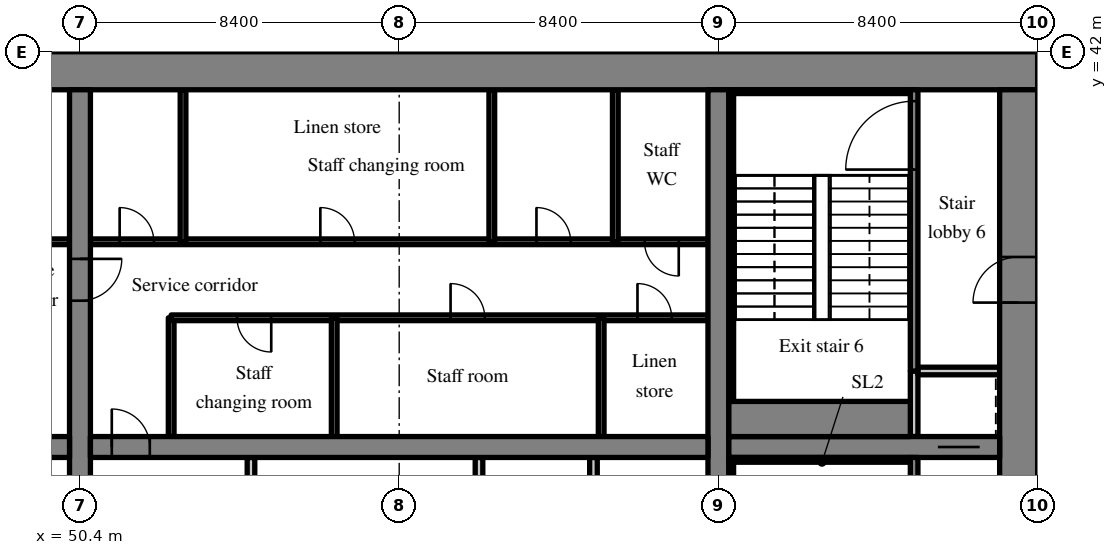
"""IFC4 building model, lengths in metres.
Left out: names, types, materials, properties, quantities, classifications, styles, units other than length and angle.
Written with IfcOpenShell. Run it as: python <this file> out.ifc"""

import sys

from ifc_helpers import new_model, si_unit, direction, frame, frame_2d, origin, place, context, subcontext, project, spatial, rectangle, extrude, source, transform, mapped, element, fill, save


model = new_model("IFC4")
c1 = context("Model", 3, precision=1e-05, world=origin(), true_north=direction((0.0, 1.0)))
c2 = subcontext(c1, "Body", "Model", "MODEL_VIEW")
j1 = project(units=[si_unit("LENGTHUNIT", "METRE"), si_unit("PLANEANGLEUNIT", "RADIAN")], contexts=[c1])
p1 = place(None, origin())
s1 = spatial("IfcSite", under=j1, at=p1, CompositionType="ELEMENT")
p2 = place(p1, origin())
s2 = spatial("IfcBuilding", under=s1, at=p2, CompositionType="ELEMENT")
p3 = place(p2, frame((0.0, 0.0, 62.0)))
s3 = spatial("IfcBuildingStorey", under=s2, at=p3, CompositionType="ELEMENT", Elevation=62.0)
m1 = source(origin(), c2, "Body", "SweptSolid", [
    extrude(rectangle(XDim=50.4, YDim=1.0, at=frame_2d((25.2, 0.0))), origin(), (0.0, 0.0, 1.0), 3.52),
])
p4 = place(p3, frame((25.2, 41.5, 0.0), z_axis=(0.0, 0.0, 1.0), x_axis=(1.0, 0.0, 0.0)))
e1 = element("IfcWall", 1, at=p4, inside=s3, PredefinedType="SHEAR", context=c2, shape_type="MappedRepresentation", body=[
    mapped(m1, transform((0.0, 0.0, 0.0), scale=1.0)),
])
m2 = source(origin(), c2, "Body", "SweptSolid", [
    extrude(rectangle(XDim=18.0, YDim=1.0, at=frame_2d((9.0, 0.0))), origin(), (0.0, 0.0, 1.0), 3.52),
])
p5 = place(p3, frame((75.1, 23.0, 0.0), z_axis=(0.0, 0.0, 1.0), x_axis=(0.0, 1.0, 0.0)))
e2 = element("IfcWall", 2, at=p5, inside=s3, PredefinedType="SHEAR", context=c2, shape_type="MappedRepresentation", body=[
    mapped(m2, transform((0.0, 0.0, 0.0), scale=1.0)),
])
m3 = source(origin(), c2, "Body", "SweptSolid", [
    extrude(rectangle(XDim=1.2, YDim=2.1, at=frame_2d((0.6, 1.05))), frame((0.0, 0.51, 0.0), z_axis=(0.0, -1.0, 0.0), x_axis=(1.0, 0.0, 0.0)), (0.0, 0.0, 1.0), 1.02),
])
p6 = place(p5, frame((12.4, 0.0, 0.0)))
e3 = element("IfcOpeningElement", 3, at=p6, cuts=e2, PredefinedType="OPENING", context=c2, shape_type="MappedRepresentation", body=[
    mapped(m3, transform((0.0, 0.0, 0.0), scale=1.0)),
])
m4 = source(origin(), c2, "Body", "SweptSolid", [
    extrude(rectangle(XDim=18.0, YDim=0.55, at=frame_2d((9.0, 0.0))), origin(), (0.0, 0.0, 1.0), 3.52),
])
p7 = place(p3, frame((50.4, 23.0, 0.0), z_axis=(0.0, 0.0, 1.0), x_axis=(0.0, 1.0, 0.0)))
e4 = element("IfcWall", 4, at=p7, inside=s3, PredefinedType="SHEAR", context=c2, shape_type="MappedRepresentation", body=[
    mapped(m4, transform((0.0, 0.0, 0.0), scale=1.0)),
])
m5 = source(origin(), c2, "Body", "SweptSolid", [
    extrude(rectangle(XDim=1.1, YDim=2.1, at=frame_2d((0.55, 1.05))), frame((0.0, 0.285, 0.0), z_axis=(0.0, -1.0, 0.0), x_axis=(1.0, 0.0, 0.0)), (0.0, 0.0, 1.0), 0.57),
])
p8 = place(p7, frame((12.45, 0.0, 0.0)))
e5 = element("IfcOpeningElement", 5, at=p8, cuts=e4, PredefinedType="OPENING", context=c2, shape_type="MappedRepresentation", body=[
    mapped(m5, transform((0.0, 0.0, 0.0), scale=1.0)),
])
p9 = place(p3, frame((67.2, 23.0, 0.0), z_axis=(0.0, 0.0, 1.0), x_axis=(0.0, 1.0, 0.0)))
e6 = element("IfcWall", 6, at=p9, inside=s3, PredefinedType="SHEAR", context=c2, shape_type="MappedRepresentation", body=[
    mapped(m4, transform((0.0, 0.0, 0.0), scale=1.0)),
])
m6 = source(origin(), c2, "Body", "SweptSolid", [
    extrude(rectangle(XDim=16.25, YDim=0.55, at=frame_2d((8.125, 0.0))), origin(), (0.0, 0.0, 1.0), 3.52),
])
p10 = place(p3, frame((33.875, 31.6, 0.0), z_axis=(0.0, 0.0, 1.0), x_axis=(1.0, 0.0, 0.0)))
e7 = element("IfcWall", 7, at=p10, inside=s3, PredefinedType="SHEAR", context=c2, shape_type="MappedRepresentation", body=[
    mapped(m6, transform((0.0, 0.0, 0.0), scale=1.0)),
])
m7 = source(origin(), c2, "Body", "SweptSolid", [
    extrude(rectangle(XDim=1.0, YDim=2.1, at=frame_2d((0.5, 1.05))), frame((0.0, 0.285, 0.0), z_axis=(0.0, -1.0, 0.0), x_axis=(1.0, 0.0, 0.0)), (0.0, 0.0, 1.0), 0.57),
])
p11 = place(p10, frame((14.687, 0.0, 0.0)))
e8 = element("IfcOpeningElement", 8, at=p11, cuts=e7, PredefinedType="OPENING", context=c2, shape_type="MappedRepresentation", body=[
    mapped(m7, transform((0.0, 0.0, 0.0), scale=1.0)),
])
p12 = place(p3, frame((50.675, 31.6, 0.0), z_axis=(0.0, 0.0, 1.0), x_axis=(1.0, 0.0, 0.0)))
e9 = element("IfcWall", 9, at=p12, inside=s3, PredefinedType="SHEAR", context=c2, shape_type="MappedRepresentation", body=[
    mapped(m6, transform((0.0, 0.0, 0.0), scale=1.0)),
])
p13 = place(p12, frame((0.562, 0.0, 0.0)))
e10 = element("IfcOpeningElement", 10, at=p13, cuts=e9, PredefinedType="OPENING", context=c2, shape_type="MappedRepresentation", body=[
    mapped(m7, transform((0.0, 0.0, 0.0), scale=1.0)),
])
m8 = source(origin(), c2, "Body", "SweptSolid", [
    extrude(rectangle(XDim=7.125, YDim=0.55, at=frame_2d((3.562, 0.0))), origin(), (0.0, 0.0, 1.0), 3.52),
])
p14 = place(p3, frame((67.475, 31.6, 0.0), z_axis=(0.0, 0.0, 1.0), x_axis=(1.0, 0.0, 0.0)))
e11 = element("IfcWall", 11, at=p14, inside=s3, PredefinedType="SHEAR", context=c2, shape_type="MappedRepresentation", body=[
    mapped(m8, transform((0.0, 0.0, 0.0), scale=1.0)),
])
p15 = place(p14, frame((5.5, 0.0, 0.0)))
e12 = element("IfcOpeningElement", 12, at=p15, cuts=e11, PredefinedType="OPENING", context=c2, shape_type="MappedRepresentation", body=[
    mapped(m5, transform((0.0, 0.0, 0.0), scale=1.0)),
])
m9 = source(origin(), c2, "Body", "SweptSolid", [
    extrude(rectangle(XDim=3.559, YDim=0.3, at=frame_2d((1.78, 0.0))), origin(), (0.0, 0.0, 1.0), 3.52),
])
p16 = place(p3, frame((76.523, 43.292, 0.0), z_axis=(0.0, 0.0, 1.0), x_axis=(-0.35779745313, -0.933799219604, 0.0)))
e13 = element("IfcWall", 13, at=p16, inside=s3, PredefinedType="SOLIDWALL", context=c2, shape_type="MappedRepresentation", body=[
    mapped(m9, transform((0.0, 0.0, 0.0), scale=1.0)),
])
m10 = source(origin(), c2, "Body", "SweptSolid", [
    extrude(rectangle(XDim=1.5, YDim=2.0, at=frame_2d((0.75, 1.0))), frame((0.0, 0.16, 0.0), z_axis=(0.0, -1.0, 0.0), x_axis=(1.0, 0.0, 0.0)), (0.0, 0.0, 1.0), 0.32),
])
p17 = place(p16, frame((0.156, 0.0, 0.9)))
e14 = element("IfcOpeningElement", 14, at=p17, cuts=e13, PredefinedType="OPENING", context=c2, shape_type="MappedRepresentation", body=[
    mapped(m10, transform((0.0, 0.0, 0.0), scale=1.0)),
])
m11 = source(origin(), c2, "Body", "SweptSolid", [
    extrude(rectangle(XDim=16.25, YDim=0.15, at=frame_2d((8.125, 0.0))), origin(), (0.0, 0.0, 1.0), 3.52),
])
p18 = place(p3, frame((33.875, 37.0, 0.0), z_axis=(0.0, 0.0, 1.0), x_axis=(1.0, 0.0, 0.0)))
e15 = element("IfcWall", 15, at=p18, inside=s3, PredefinedType="PARTITIONING", context=c2, shape_type="MappedRepresentation", body=[
    mapped(m11, transform((0.0, 0.0, 0.0), scale=1.0)),
])
m12 = source(origin(), c2, "Body", "SweptSolid", [
    extrude(rectangle(XDim=0.9, YDim=2.1, at=frame_2d((0.45, 1.05))), frame((0.0, 0.085, 0.0), z_axis=(0.0, -1.0, 0.0), x_axis=(1.0, 0.0, 0.0)), (0.0, 0.0, 1.0), 0.17),
])
p19 = place(p18, frame((3.206, 0.0, 0.0)))
e16 = element("IfcOpeningElement", 16, at=p19, cuts=e15, PredefinedType="OPENING", context=c2, shape_type="MappedRepresentation", body=[
    mapped(m12, transform((0.0, 0.0, 0.0), scale=1.0)),
])
p20 = place(p18, frame((8.081, 0.0, 0.0)))
e17 = element("IfcOpeningElement", 17, at=p20, cuts=e15, PredefinedType="OPENING", context=c2, shape_type="MappedRepresentation", body=[
    mapped(m12, transform((0.0, 0.0, 0.0), scale=1.0)),
])
p21 = place(p18, frame((11.331, 0.0, 0.0)))
e18 = element("IfcOpeningElement", 18, at=p21, cuts=e15, PredefinedType="OPENING", context=c2, shape_type="MappedRepresentation", body=[
    mapped(m12, transform((0.0, 0.0, 0.0), scale=1.0)),
])
p22 = place(p18, frame((14.581, 0.0, 0.0)))
e19 = element("IfcOpeningElement", 19, at=p22, cuts=e15, PredefinedType="OPENING", context=c2, shape_type="MappedRepresentation", body=[
    mapped(m12, transform((0.0, 0.0, 0.0), scale=1.0)),
])
m13 = source(origin(), c2, "Body", "SweptSolid", [
    extrude(rectangle(XDim=8.325, YDim=0.2, at=frame_2d((4.163, 0.0))), origin(), (0.0, 0.0, 1.0), 3.52),
])
for number, where, z_axis, x_axis in (
    (20, (54.9, 23.0, 0.0), (0.0, 0.0, 1.0), (0.0, 1.0, 0.0)),
    (21, (60.9, 23.0, 0.0), (0.0, 0.0, 1.0), (0.0, 1.0, 0.0)),
    (22, (63.912, 23.0, 0.0), (0.0, 0.0, 1.0), (0.0, 1.0, 0.0)),
):
    element("IfcWall", number, at=place(p3, frame(where, z_axis=z_axis, x_axis=x_axis)), inside=s3, PredefinedType="PARTITIONING", context=c2, shape_type="MappedRepresentation", body=[
        mapped(m13, transform((0.0, 0.0, 0.0), scale=1.0)),
    ])
m14 = source(origin(), c2, "Body", "SweptSolid", [
    extrude(rectangle(XDim=3.125, YDim=0.15, at=frame_2d((1.562, 0.0))), origin(), (0.0, 0.0, 1.0), 3.52),
])
p23 = place(p3, frame((52.8, 31.875, 0.0), z_axis=(0.0, 0.0, 1.0), x_axis=(0.0, 1.0, 0.0)))
e23 = element("IfcWall", 23, at=p23, inside=s3, PredefinedType="PARTITIONING", context=c2, shape_type="MappedRepresentation", body=[
    mapped(m14, transform((0.0, 0.0, 0.0), scale=1.0)),
])
m15 = source(origin(), c2, "Body", "SweptSolid", [
    extrude(rectangle(XDim=14.125, YDim=0.15, at=frame_2d((7.062, 0.0))), origin(), (0.0, 0.0, 1.0), 3.52),
])
p24 = place(p3, frame((66.925, 35.0, 0.0), z_axis=(0.0, 0.0, 1.0), x_axis=(-1.0, 0.0, 0.0)))
e24 = element("IfcWall", 24, at=p24, inside=s3, PredefinedType="PARTITIONING", context=c2, shape_type="MappedRepresentation", body=[
    mapped(m15, transform((0.0, 0.0, 0.0), scale=1.0)),
])
p25 = place(p24, frame((0.955, 0.0, 0.0)))
e25 = element("IfcOpeningElement", 25, at=p25, cuts=e24, PredefinedType="OPENING", context=c2, shape_type="MappedRepresentation", body=[
    mapped(m12, transform((0.0, 0.0, 0.0), scale=1.0)),
])
p26 = place(p24, frame((5.873, 0.0, 0.0)))
e26 = element("IfcOpeningElement", 26, at=p26, cuts=e24, PredefinedType="OPENING", context=c2, shape_type="MappedRepresentation", body=[
    mapped(m12, transform((0.0, 0.0, 0.0), scale=1.0)),
])
p27 = place(p24, frame((11.492, 0.0, 0.0)))
e27 = element("IfcOpeningElement", 27, at=p27, cuts=e24, PredefinedType="OPENING", context=c2, shape_type="MappedRepresentation", body=[
    mapped(m12, transform((0.0, 0.0, 0.0), scale=1.0)),
])
p28 = place(p3, frame((66.925, 37.0, 0.0), z_axis=(0.0, 0.0, 1.0), x_axis=(-1.0, 0.0, 0.0)))
e28 = element("IfcWall", 28, at=p28, inside=s3, PredefinedType="PARTITIONING", context=c2, shape_type="MappedRepresentation", body=[
    mapped(m11, transform((0.0, 0.0, 0.0), scale=1.0)),
])
p29 = place(p28, frame((0.769, 0.0, 0.0)))
e29 = element("IfcOpeningElement", 29, at=p29, cuts=e28, PredefinedType="OPENING", context=c2, shape_type="MappedRepresentation", body=[
    mapped(m12, transform((0.0, 0.0, 0.0), scale=1.0)),
])
p30 = place(p28, frame((3.613, 0.0, 0.0)))
e30 = element("IfcOpeningElement", 30, at=p30, cuts=e28, PredefinedType="OPENING", context=c2, shape_type="MappedRepresentation", body=[
    mapped(m12, transform((0.0, 0.0, 0.0), scale=1.0)),
])
p31 = place(p28, frame((9.3, 0.0, 0.0)))
e31 = element("IfcOpeningElement", 31, at=p31, cuts=e28, PredefinedType="OPENING", context=c2, shape_type="MappedRepresentation", body=[
    mapped(m12, transform((0.0, 0.0, 0.0), scale=1.0)),
])
p32 = place(p28, frame((14.581, 0.0, 0.0)))
e32 = element("IfcOpeningElement", 32, at=p32, cuts=e28, PredefinedType="OPENING", context=c2, shape_type="MappedRepresentation", body=[
    mapped(m12, transform((0.0, 0.0, 0.0), scale=1.0)),
])
for number, where, z_axis, x_axis in (
    (33, (64.115, 31.875, 0.0), (0.0, 0.0, 1.0), (0.0, 1.0, 0.0)),
    (34, (57.09, 31.875, 0.0), (0.0, 0.0, 1.0), (0.0, 1.0, 0.0)),
):
    element("IfcWall", number, at=place(p3, frame(where, z_axis=z_axis, x_axis=x_axis)), inside=s3, PredefinedType="PARTITIONING", context=c2, shape_type="MappedRepresentation", body=[
        mapped(m14, transform((0.0, 0.0, 0.0), scale=1.0)),
    ])
m16 = source(origin(), c2, "Body", "SweptSolid", [
    extrude(rectangle(XDim=4.0, YDim=0.15, at=frame_2d((2.0, 0.0))), origin(), (0.0, 0.0, 1.0), 3.52),
])
for number, where, z_axis, x_axis in (
    (35, (64.487, 37.0, 0.0), (0.0, 0.0, 1.0), (0.0, 1.0, 0.0)),
    (36, (61.237, 37.0, 0.0), (0.0, 0.0, 1.0), (0.0, 1.0, 0.0)),
    (37, (53.112, 37.0, 0.0), (0.0, 0.0, 1.0), (0.0, 1.0, 0.0)),
):
    element("IfcWall", number, at=place(p3, frame(where, z_axis=z_axis, x_axis=x_axis)), inside=s3, PredefinedType="PARTITIONING", context=c2, shape_type="MappedRepresentation", body=[
        mapped(m16, transform((0.0, 0.0, 0.0), scale=1.0)),
    ])
m17 = source(origin(), c2, "Body", "SweptSolid", [
    extrude(rectangle(XDim=8.325, YDim=0.2, at=frame_2d((4.163, 0.0))), origin(), (0.0, 0.0, 1.0), 3.52),
])
p33 = place(p3, frame((72.35, 23.0, 0.0), z_axis=(0.0, 0.0, 1.0), x_axis=(0.0, 1.0, 0.0)))
e38 = element("IfcWall", 38, at=p33, inside=s3, PredefinedType="SOLIDWALL", context=c2, shape_type="MappedRepresentation", body=[
    mapped(m17, transform((0.0, 0.0, 0.0), scale=1.0)),
])
m18 = source(origin(), c2, "Body", "SweptSolid", [
    extrude(rectangle(XDim=1.2, YDim=2.1, at=frame_2d((0.6, 1.05))), frame((0.0, 0.11, 0.0), z_axis=(0.0, -1.0, 0.0), x_axis=(1.0, 0.0, 0.0)), (0.0, 0.0, 1.0), 0.22),
])
p34 = place(p33, frame((6.5, 0.0, 0.0)))
e39 = element("IfcOpeningElement", 39, at=p34, cuts=e38, PredefinedType="OPENING", context=c2, shape_type="MappedRepresentation", body=[
    mapped(m18, transform((0.0, 0.0, 0.0), scale=1.0)),
])
m19 = source(origin(), c2, "Body", "SweptSolid", [
    extrude(rectangle(XDim=1.725, YDim=0.2, at=frame_2d((0.863, 0.0))), origin(), (0.0, 0.0, 1.0), 3.52),
])
p35 = place(p3, frame((72.35, 31.875, 0.0), z_axis=(0.0, 0.0, 1.0), x_axis=(0.0, 1.0, 0.0)))
e40 = element("IfcWall", 40, at=p35, inside=s3, PredefinedType="SOLIDWALL", context=c2, shape_type="MappedRepresentation", body=[
    mapped(m19, transform((0.0, 0.0, 0.0), scale=1.0)),
])
m20 = source(origin(), c2, "Body", "SweptSolid", [
    extrude(rectangle(XDim=2.15, YDim=0.2, at=frame_2d((1.075, 0.0))), origin(), (0.0, 0.0, 1.0), 3.52),
])
p36 = place(p3, frame((72.45, 33.6, 0.0), z_axis=(0.0, 0.0, 1.0), x_axis=(1.0, 0.0, 0.0)))
e41 = element("IfcWall", 41, at=p36, inside=s3, PredefinedType="SOLIDWALL", context=c2, shape_type="MappedRepresentation", body=[
    mapped(m20, transform((0.0, 0.0, 0.0), scale=1.0)),
])
m21 = source(origin(), c2, "Body", "SweptSolid", [
    extrude(rectangle(XDim=7.4, YDim=0.2, at=frame_2d((3.7, 0.0))), origin(), (0.0, 0.0, 1.0), 3.52),
])
p37 = place(p3, frame((72.35, 33.6, 0.0), z_axis=(0.0, 0.0, 1.0), x_axis=(0.0, 1.0, 0.0)))
e42 = element("IfcWall", 42, at=p37, inside=s3, PredefinedType="SOLIDWALL", context=c2, shape_type="MappedRepresentation", body=[
    mapped(m21, transform((0.0, 0.0, 0.0), scale=1.0)),
])
m22 = source(origin(), c2, "Body", "SweptSolid", [
    extrude(rectangle(XDim=1.8, YDim=2.1, at=frame_2d((0.9, 1.05))), frame((0.0, 0.11, 0.0), z_axis=(0.0, -1.0, 0.0), x_axis=(1.0, 0.0, 0.0)), (0.0, 0.0, 1.0), 0.22),
])
p38 = place(p37, frame((5.3, 0.0, 0.0)))
e43 = element("IfcOpeningElement", 43, at=p38, cuts=e42, PredefinedType="OPENING", context=c2, shape_type="MappedRepresentation", body=[
    mapped(m22, transform((0.0, 0.0, 0.0), scale=1.0)),
])
m23 = source(origin(), c2, "Body", "SweptSolid", [
    extrude(rectangle(XDim=4.775, YDim=0.125, at=frame_2d((2.387, 0.0))), origin(), (0.0, 0.0, 1.0), 3.52),
])
p39 = place(p3, frame((67.475, 31.262, 0.0), z_axis=(0.0, 0.0, 1.0), x_axis=(1.0, 0.0, 0.0)))
e44 = element("IfcWall", 44, at=p39, inside=s3, PredefinedType="SOLIDWALL", context=c2, shape_type="MappedRepresentation", body=[
    mapped(m23, transform((0.0, 0.0, 0.0), scale=1.0)),
])
m24 = source(origin(), c2, "Body", "SweptSolid", [
    extrude(rectangle(XDim=8.1, YDim=0.125, at=frame_2d((4.05, 0.0))), origin(), (0.0, 0.0, 1.0), 3.52),
])
p40 = place(p3, frame((67.537, 23.1, 0.0), z_axis=(0.0, 0.0, 1.0), x_axis=(0.0, 1.0, 0.0)))
e45 = element("IfcWall", 45, at=p40, inside=s3, PredefinedType="SOLIDWALL", context=c2, shape_type="MappedRepresentation", body=[
    mapped(m24, transform((0.0, 0.0, 0.0), scale=1.0)),
])
m25 = source(origin(), c2, "Body", "SweptSolid", [
    extrude(rectangle(XDim=4.775, YDim=0.1, at=frame_2d((2.387, 0.0))), origin(), (0.0, 0.0, 1.0), 3.52),
])
p41 = place(p3, frame((67.475, 40.95, 0.0), z_axis=(0.0, 0.0, 1.0), x_axis=(1.0, 0.0, 0.0)))
e46 = element("IfcWall", 46, at=p41, inside=s3, PredefinedType="SOLIDWALL", context=c2, shape_type="MappedRepresentation", body=[
    mapped(m25, transform((0.0, 0.0, 0.0), scale=1.0)),
])
m26 = source(origin(), c2, "Body", "SweptSolid", [
    extrude(rectangle(XDim=4.775, YDim=0.925, at=frame_2d((2.387, 0.0))), origin(), (0.0, 0.0, 1.0), 3.52),
])
p42 = place(p3, frame((67.475, 32.337, 0.0), z_axis=(0.0, 0.0, 1.0), x_axis=(1.0, 0.0, 0.0)))
e47 = element("IfcWall", 47, at=p42, inside=s3, PredefinedType="SOLIDWALL", context=c2, shape_type="MappedRepresentation", body=[
    mapped(m26, transform((0.0, 0.0, 0.0), scale=1.0)),
])
p43 = place(p3, frame((67.537, 32.8, 0.0), z_axis=(0.0, 0.0, 1.0), x_axis=(0.0, 1.0, 0.0)))
e48 = element("IfcWall", 48, at=p43, inside=s3, PredefinedType="SOLIDWALL", context=c2, shape_type="MappedRepresentation", body=[
    mapped(m24, transform((0.0, 0.0, 0.0), scale=1.0)),
])
m27 = source(origin(), c2, "Body", "SweptSolid", [
    extrude(rectangle(XDim=1.0, YDim=2.1, at=frame_2d((0.5, 1.05))), frame((0.0, 0.025, 0.0), z_axis=(0.0, -1.0, 0.0), x_axis=(1.0, 0.0, 0.0)), (0.0, 0.0, 1.0), 0.05),
])
p44 = place(p13, origin())
e49 = element("IfcDoor", 49, at=p44, inside=s3, OperationType="SINGLE_SWING_LEFT", PredefinedType="DOOR", context=c2, shape_type="MappedRepresentation", body=[
    mapped(m27, transform((0.0, 0.0, 0.0), scale=1.0)),
])
fill(e10, e49)
m28 = source(origin(), c2, "Body", "SweptSolid", [
    extrude(rectangle(XDim=0.9, YDim=2.1, at=frame_2d((0.45, 1.05))), frame((0.0, 0.025, 0.0), z_axis=(0.0, -1.0, 0.0), x_axis=(1.0, 0.0, 0.0)), (0.0, 0.0, 1.0), 0.05),
])
p45 = place(p25, origin())
e50 = element("IfcDoor", 50, at=p45, inside=s3, OperationType="SINGLE_SWING_RIGHT", PredefinedType="DOOR", context=c2, shape_type="MappedRepresentation", body=[
    mapped(m28, transform((0.0, 0.0, 0.0), scale=1.0)),
])
fill(e25, e50)
p46 = place(p26, origin())
e51 = element("IfcDoor", 51, at=p46, inside=s3, OperationType="SINGLE_SWING_RIGHT", PredefinedType="DOOR", context=c2, shape_type="MappedRepresentation", body=[
    mapped(m28, transform((0.0, 0.0, 0.0), scale=1.0)),
])
fill(e26, e51)
p47 = place(p27, origin())
e52 = element("IfcDoor", 52, at=p47, inside=s3, OperationType="SINGLE_SWING_LEFT", PredefinedType="DOOR", context=c2, shape_type="MappedRepresentation", body=[
    mapped(m28, transform((0.0, 0.0, 0.0), scale=1.0)),
])
fill(e27, e52)
p48 = place(p29, origin())
e53 = element("IfcDoor", 53, at=p48, inside=s3, OperationType="SINGLE_SWING_LEFT", PredefinedType="DOOR", context=c2, shape_type="MappedRepresentation", body=[
    mapped(m28, transform((0.0, 0.0, 0.0), scale=1.0)),
])
fill(e29, e53)
p49 = place(p30, origin())
e54 = element("IfcDoor", 54, at=p49, inside=s3, OperationType="SINGLE_SWING_RIGHT", PredefinedType="DOOR", context=c2, shape_type="MappedRepresentation", body=[
    mapped(m28, transform((0.0, 0.0, 0.0), scale=1.0)),
])
fill(e30, e54)
p50 = place(p31, origin())
e55 = element("IfcDoor", 55, at=p50, inside=s3, OperationType="SINGLE_SWING_RIGHT", PredefinedType="DOOR", context=c2, shape_type="MappedRepresentation", body=[
    mapped(m28, transform((0.0, 0.0, 0.0), scale=1.0)),
])
fill(e31, e55)
p51 = place(p32, origin())
e56 = element("IfcDoor", 56, at=p51, inside=s3, OperationType="SINGLE_SWING_RIGHT", PredefinedType="DOOR", context=c2, shape_type="MappedRepresentation", body=[
    mapped(m28, transform((0.0, 0.0, 0.0), scale=1.0)),
])
fill(e32, e56)
m29 = source(origin(), c2, "Body", "SweptSolid", [
    extrude(rectangle(XDim=1.1, YDim=2.1, at=frame_2d((0.55, 1.05))), frame((0.0, 0.025, 0.0), z_axis=(0.0, -1.0, 0.0), x_axis=(1.0, 0.0, 0.0)), (0.0, 0.0, 1.0), 0.05),
])
p52 = place(p15, origin())
e57 = element("IfcDoor", 57, at=p52, inside=s3, OperationType="SLIDING_TO_RIGHT", PredefinedType="DOOR", context=c2, shape_type="MappedRepresentation", body=[
    mapped(m29, transform((0.0, 0.0, 0.0), scale=1.0)),
])
fill(e12, e57)
m30 = source(origin(), c2, "Body", "SweptSolid", [
    extrude(rectangle(XDim=1.8, YDim=2.1, at=frame_2d((0.9, 1.05))), frame((0.0, 0.025, 0.0), z_axis=(0.0, -1.0, 0.0), x_axis=(1.0, 0.0, 0.0)), (0.0, 0.0, 1.0), 0.05),
])
p53 = place(p38, origin())
e58 = element("IfcDoor", 58, at=p53, inside=s3, OperationType="SINGLE_SWING_LEFT", PredefinedType="DOOR", context=c2, shape_type="MappedRepresentation", body=[
    mapped(m30, transform((0.0, 0.0, 0.0), scale=1.0)),
])
fill(e43, e58)
m31 = source(origin(), c2, "Body", "SweptSolid", [
    extrude(rectangle(XDim=1.2, YDim=2.1, at=frame_2d((0.6, 1.05))), frame((0.0, 0.025, 0.0), z_axis=(0.0, -1.0, 0.0), x_axis=(1.0, 0.0, 0.0)), (0.0, 0.0, 1.0), 0.05),
])
p54 = place(p6, origin())
e59 = element("IfcDoor", 59, at=p54, inside=s3, OperationType="SINGLE_SWING_LEFT", PredefinedType="DOOR", context=c2, shape_type="MappedRepresentation", body=[
    mapped(m31, transform((0.0, 0.0, 0.0), scale=1.0)),
])
fill(e3, e59)
p55 = place(p8, origin())
e60 = element("IfcDoor", 60, at=p55, inside=s3, OperationType="SINGLE_SWING_RIGHT", PredefinedType="DOOR", context=c2, shape_type="MappedRepresentation", body=[
    mapped(m29, transform((0.0, 0.0, 0.0), scale=1.0)),
])
fill(e5, e60)
save(model, sys.argv[1])
